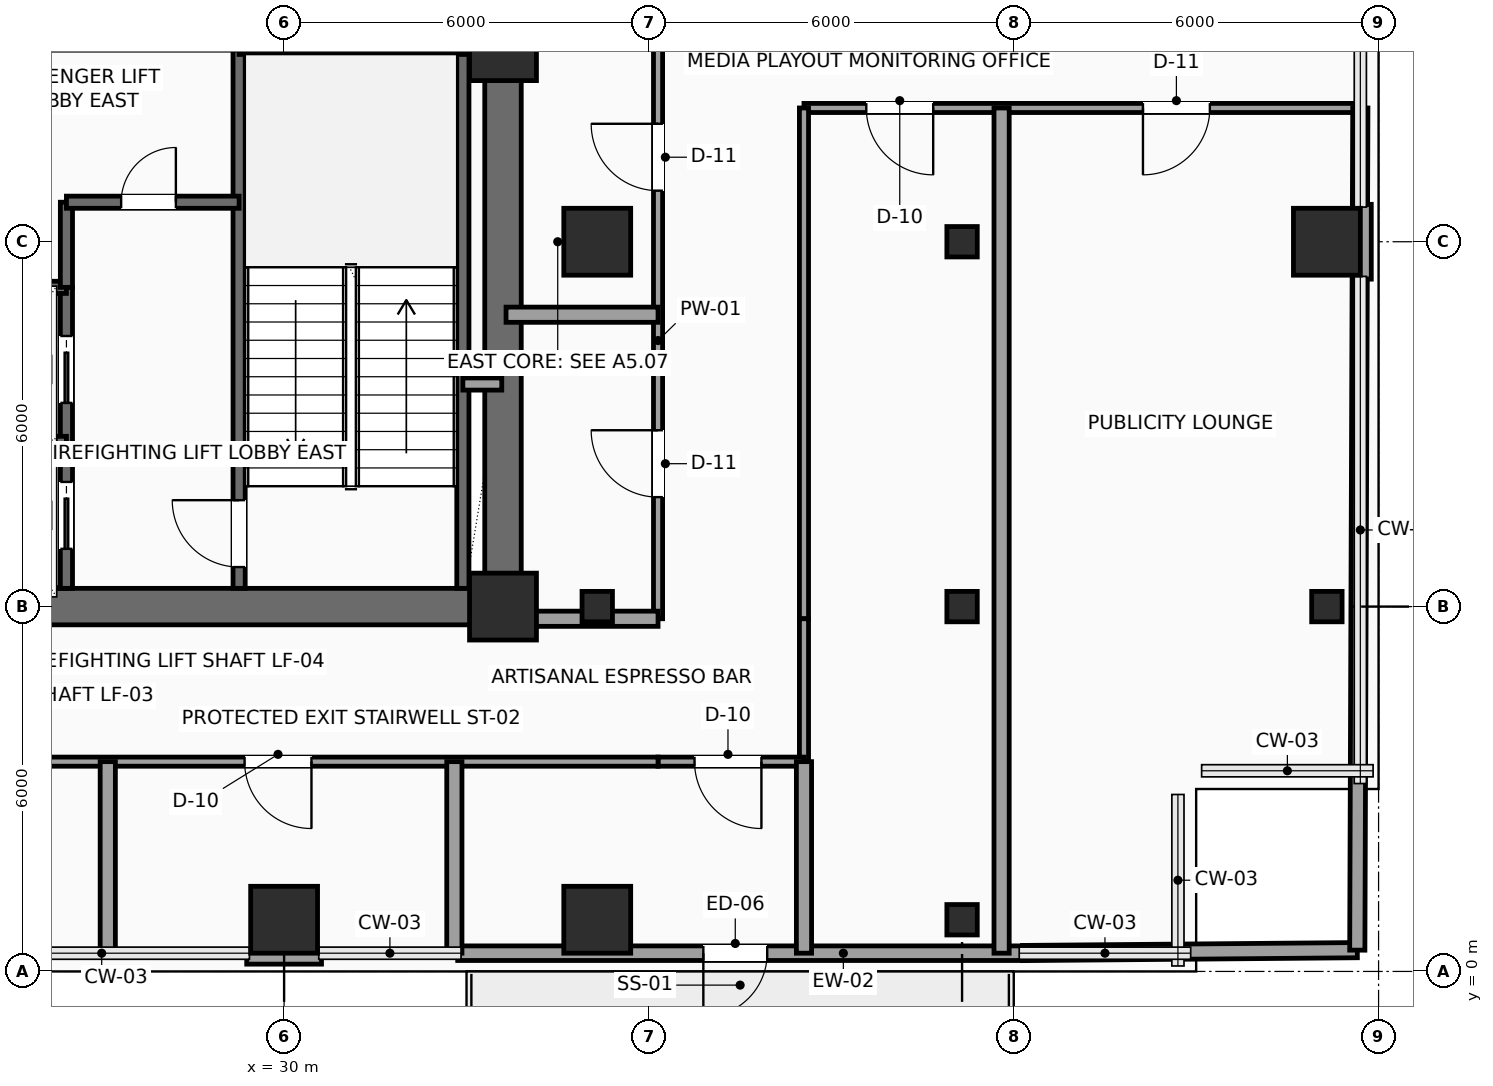
"""IFC4 building model, lengths in metres.
Left out: names, types, materials, properties, quantities, classifications, styles, units other than length and angle.
Written with IfcOpenShell. Run it as: python <this file> out.ifc"""

import sys

from ifc_helpers import new_model, si_unit, direction, frame, frame_2d, origin, origin_2d, place, context, subcontext, project, spatial, rectangle, hollow_rectangle, extrude, element, fill, save


model = new_model("IFC4")
c1 = context("Model", 3, precision=1e-05, world=origin(), true_north=direction((0.0, 1.0)))
c2 = subcontext(c1, "Body", "Model", "MODEL_VIEW")
j1 = project(units=[si_unit("LENGTHUNIT", "METRE"), si_unit("PLANEANGLEUNIT", "RADIAN")], contexts=[c1])
p1 = place(None, origin())
s1 = spatial("IfcSite", under=j1, at=p1, CompositionType="ELEMENT")
p2 = place(p1, origin())
s2 = spatial("IfcBuilding", under=s1, at=p2, CompositionType="ELEMENT")
p3 = place(p2, frame((0.0, 0.0, 134.4)))
s3 = spatial("IfcBuildingStorey", under=s2, at=p3, CompositionType="ELEMENT", Elevation=134.4)
for number, where, z_axis, x_axis in (
    (1, (33.6, 6.0, 0.0), (0.0, 0.0, 1.0), (1.0, 0.0, 0.0)),
    (2, (33.6, 15.2, 0.0), (0.0, 0.0, 1.0), (1.0, 0.0, 0.0)),
    (3, (30.0, 0.85, 0.0), (0.0, 0.0, 1.0), (1.0, 0.0, 0.0)),
    (4, (35.15, 0.85, 0.0), (0.0, 0.0, 1.0), (1.0, 0.0, 0.0)),
):
    element("IfcColumn", number, at=place(p3, frame(where, z_axis=z_axis, x_axis=x_axis)), inside=s3, PredefinedType="COLUMN", context=c2, shape_type="SweptSolid", body=[
        extrude(rectangle(XDim=1.1, YDim=1.1, at=origin_2d()), origin(), (0.0, 0.0, 1.0), 3.75),
    ])
p4 = place(p3, frame((35.15, 6.0, 0.0), z_axis=(0.0, 0.0, 1.0), x_axis=(1.0, 0.0, 0.0)))
e5 = element("IfcColumn", 5, at=p4, inside=s3, PredefinedType="COLUMN", context=c2, shape_type="SweptSolid", body=[
    extrude(hollow_rectangle(XDim=0.5, YDim=0.5, WallThickness=0.025, InnerFilletRadius=0.025, OuterFilletRadius=0.04, at=origin_2d()), origin(), (0.0, 0.0, 1.0), 3.75),
])
p5 = place(p3, frame((35.15, 12.0, 0.0), z_axis=(0.0, 0.0, 1.0), x_axis=(1.0, 0.0, 0.0)))
e6 = element("IfcColumn", 6, at=p5, inside=s3, PredefinedType="COLUMN", context=c2, shape_type="SweptSolid", body=[
    extrude(rectangle(XDim=1.1, YDim=1.1, at=origin_2d()), origin(), (0.0, 0.0, 1.0), 3.75),
])
for number, where, z_axis, x_axis in (
    (7, (41.15, 0.85, 0.0), (0.0, 0.0, 1.0), (1.0, 0.0, 0.0)),
    (8, (41.15, 6.0, 0.0), (0.0, 0.0, 1.0), (1.0, 0.0, 0.0)),
    (9, (41.15, 12.0, 0.0), (0.0, 0.0, 1.0), (1.0, 0.0, 0.0)),
    (10, (47.15, 6.0, 0.0), (0.0, 0.0, 1.0), (1.0, 0.0, 0.0)),
):
    element("IfcColumn", number, at=place(p3, frame(where, z_axis=z_axis, x_axis=x_axis)), inside=s3, PredefinedType="COLUMN", context=c2, shape_type="SweptSolid", body=[
        extrude(hollow_rectangle(XDim=0.5, YDim=0.5, WallThickness=0.025, InnerFilletRadius=0.025, OuterFilletRadius=0.04, at=origin_2d()), origin(), (0.0, 0.0, 1.0), 3.75),
    ])
p6 = place(p3, frame((47.15, 12.0, 0.0), z_axis=(0.0, 0.0, 1.0), x_axis=(1.0, 0.0, 0.0)))
e11 = element("IfcColumn", 11, at=p6, inside=s3, PredefinedType="COLUMN", context=c2, shape_type="SweptSolid", body=[
    extrude(rectangle(XDim=1.1, YDim=1.1, at=origin_2d()), origin(), (0.0, 0.0, 1.0), 3.75),
])
p7 = place(p3, frame((42.145, 0.3, 0.0), z_axis=(0.0, 0.0, 1.0), x_axis=(-1.0, 0.0, 0.0)))
e12 = element("IfcWall", 12, at=p7, inside=s3, PredefinedType="SOLIDWALL", context=c2, shape_type="SweptSolid", body=[
    extrude(rectangle(XDim=9.29, YDim=0.24, at=frame_2d((4.645, 0.0))), origin(), (0.0, 0.0, 1.0), 3.525),
])
p8 = place(p7, frame((4.2, 0.0, 0.0)))
e13 = element("IfcOpeningElement", 13, at=p8, cuts=e12, PredefinedType="OPENING", context=c2, shape_type="SweptSolid", body=[
    extrude(rectangle(XDim=1.05, YDim=2.2, at=frame_2d((0.525, 1.1))), frame((0.0, 0.13, 0.0), z_axis=(0.0, -1.0, 0.0), x_axis=(1.0, 0.0, 0.0)), (0.0, 0.0, 1.0), 0.26),
])
for number, where, z_axis, x_axis in (
    (14, (47.76, 12.615, 0.0), (0.0, 0.0, 1.0), (0.0, -1.0, 0.0)),
    (15, (30.615, 0.24, 0.0), (0.0, 0.0, 1.0), (-1.0, 0.0, 0.0)),
):
    element("IfcWall", number, at=place(p3, frame(where, z_axis=z_axis, x_axis=x_axis)), inside=s3, PredefinedType="SOLIDWALL", context=c2, shape_type="SweptSolid", body=[
        extrude(rectangle(XDim=1.23, YDim=0.24, at=frame_2d((0.615, 0.0))), origin(), (0.0, 0.0, 1.0), 3.525),
    ])
p9 = place(p3, frame((24.0, 6.0, 0.0), z_axis=(0.0, 0.0, 1.0), x_axis=(1.0, 0.0, 0.0)))
e16 = element("IfcWall", 16, at=p9, inside=s3, PredefinedType="SHEAR", context=c2, shape_type="SweptSolid", body=[
    extrude(rectangle(XDim=9.6, YDim=0.6, at=frame_2d((4.8, 0.0))), origin(), (0.0, 0.0, 1.0), 3.525),
])
p10 = place(p3, frame((33.6, 6.0, 0.0), z_axis=(0.0, 0.0, 1.0), x_axis=(0.0, 1.0, 0.0)))
e17 = element("IfcWall", 17, at=p10, inside=s3, PredefinedType="SHEAR", context=c2, shape_type="SweptSolid", body=[
    extrude(rectangle(XDim=12.0, YDim=0.6, at=frame_2d((6.0, 0.0))), origin(), (0.0, 0.0, 1.0), 3.525),
])
p11 = place(p10, frame((10.2, 0.0, 0.0)))
e18 = element("IfcOpeningElement", 18, at=p11, cuts=e17, PredefinedType="OPENING", context=c2, shape_type="SweptSolid", body=[
    extrude(rectangle(XDim=0.9, YDim=2.15, at=frame_2d((0.45, 1.075))), frame((0.0, 0.31, 0.0), z_axis=(0.0, -1.0, 0.0), x_axis=(1.0, 0.0, 0.0)), (0.0, 0.0, 1.0), 0.62),
])
p12 = place(p3, frame((29.26, 6.3, 0.0), z_axis=(0.0, 0.0, 1.0), x_axis=(0.0, 1.0, 0.0)))
e19 = element("IfcWall", 19, at=p12, inside=s3, PredefinedType="SHEAR", context=c2, shape_type="SweptSolid", body=[
    extrude(rectangle(XDim=8.88, YDim=0.2, at=frame_2d((4.44, 0.0))), origin(), (0.0, 0.0, 1.0), 3.525),
])
p13 = place(p12, frame((0.35, 0.0, 0.0)))
e20 = element("IfcOpeningElement", 20, at=p13, cuts=e19, PredefinedType="OPENING", context=c2, shape_type="SweptSolid", body=[
    extrude(rectangle(XDim=1.1, YDim=2.2, at=frame_2d((0.55, 1.1))), frame((0.0, 0.11, 0.0), z_axis=(0.0, -1.0, 0.0), x_axis=(1.0, 0.0, 0.0)), (0.0, 0.0, 1.0), 0.22),
])
p14 = place(p3, frame((32.94, 6.3, 0.0), z_axis=(0.0, 0.0, 1.0), x_axis=(0.0, 1.0, 0.0)))
e21 = element("IfcWall", 21, at=p14, inside=s3, PredefinedType="SHEAR", context=c2, shape_type="SweptSolid", body=[
    extrude(rectangle(XDim=8.88, YDim=0.2, at=frame_2d((4.44, 0.0))), origin(), (0.0, 0.0, 1.0), 3.525),
])
p15 = place(p3, frame((29.26, 15.18, 0.0), z_axis=(0.0, 0.0, 1.0), x_axis=(1.0, 0.0, 0.0)))
e22 = element("IfcWall", 22, at=p15, inside=s3, PredefinedType="SHEAR", context=c2, shape_type="SweptSolid", body=[
    extrude(rectangle(XDim=4.04, YDim=0.2, at=frame_2d((2.02, 0.0))), origin(), (0.0, 0.0, 1.0), 3.525),
])
p16 = place(p3, frame((26.42, 6.3, 0.0), z_axis=(0.0, 0.0, 1.0), x_axis=(0.0, 1.0, 0.0)))
e23 = element("IfcWall", 23, at=p16, inside=s3, PredefinedType="SHEAR", context=c2, shape_type="SweptSolid", body=[
    extrude(rectangle(XDim=4.95, YDim=0.2, at=frame_2d((2.475, 0.0))), origin(), (0.0, 0.0, 1.0), 3.525),
])
p17 = place(p16, frame((0.65, 0.0, 0.0)))
e24 = element("IfcOpeningElement", 24, at=p17, cuts=e23, PredefinedType="OPENING", context=c2, shape_type="SweptSolid", body=[
    extrude(rectangle(XDim=1.1, YDim=2.2, at=frame_2d((0.55, 1.1))), frame((0.0, 0.11, 0.0), z_axis=(0.0, -1.0, 0.0), x_axis=(1.0, 0.0, 0.0)), (0.0, 0.0, 1.0), 0.22),
])
p18 = place(p16, frame((3.05, 0.0, 0.0)))
e25 = element("IfcOpeningElement", 25, at=p18, cuts=e23, PredefinedType="OPENING", context=c2, shape_type="SweptSolid", body=[
    extrude(rectangle(XDim=1.1, YDim=2.2, at=frame_2d((0.55, 1.1))), frame((0.0, 0.11, 0.0), z_axis=(0.0, -1.0, 0.0), x_axis=(1.0, 0.0, 0.0)), (0.0, 0.0, 1.0), 0.22),
])
for number, where, z_axis, x_axis in (
    (26, (24.25, 8.7, 0.0), (0.0, 0.0, 1.0), (1.0, 0.0, 0.0)),
    (27, (24.25, 11.25, 0.0), (0.0, 0.0, 1.0), (1.0, 0.0, 0.0)),
):
    element("IfcWall", number, at=place(p3, frame(where, z_axis=z_axis, x_axis=x_axis)), inside=s3, PredefinedType="SHEAR", context=c2, shape_type="SweptSolid", body=[
        extrude(rectangle(XDim=2.17, YDim=0.2, at=frame_2d((1.085, 0.0))), origin(), (0.0, 0.0, 1.0), 3.525),
    ])
p19 = place(p3, frame((26.42, 11.25, 0.0), z_axis=(0.0, 0.0, 1.0), x_axis=(0.0, 1.0, 0.0)))
e28 = element("IfcWall", 28, at=p19, inside=s3, PredefinedType="SHEAR", context=c2, shape_type="SweptSolid", body=[
    extrude(rectangle(XDim=1.4, YDim=0.2, at=frame_2d((0.7, 0.0))), origin(), (0.0, 0.0, 1.0), 3.525),
])
p20 = place(p3, frame((26.42, 12.65, 0.0), z_axis=(0.0, 0.0, 1.0), x_axis=(1.0, 0.0, 0.0)))
e29 = element("IfcWall", 29, at=p20, inside=s3, PredefinedType="SHEAR", context=c2, shape_type="SweptSolid", body=[
    extrude(rectangle(XDim=2.84, YDim=0.2, at=frame_2d((1.42, 0.0))), origin(), (0.0, 0.0, 1.0), 3.525),
])
p21 = place(p20, frame((0.9, 0.0, 0.0)))
e30 = element("IfcOpeningElement", 30, at=p21, cuts=e29, PredefinedType="OPENING", context=c2, shape_type="SweptSolid", body=[
    extrude(rectangle(XDim=0.9, YDim=2.15, at=frame_2d((0.45, 1.075))), frame((0.0, 0.11, 0.0), z_axis=(0.0, -1.0, 0.0), x_axis=(1.0, 0.0, 0.0)), (0.0, 0.0, 1.0), 0.22),
])
p22 = place(p3, frame((32.94, 9.66, 0.0), z_axis=(0.0, 0.0, 1.0), x_axis=(1.0, 0.0, 0.0)))
e31 = element("IfcWall", 31, at=p22, inside=s3, PredefinedType="SOLIDWALL", context=c2, shape_type="SweptSolid", body=[
    extrude(rectangle(XDim=0.64, YDim=0.2, at=frame_2d((0.32, 0.0))), origin(), (0.0, 0.0, 1.0), 3.525),
])
p23 = place(p3, frame((36.15, 5.8, 0.0), z_axis=(0.0, 0.0, 1.0), x_axis=(0.0, 1.0, 0.0)))
e32 = element("IfcWall", 32, at=p23, inside=s3, PredefinedType="PARTITIONING", context=c2, shape_type="SweptSolid", body=[
    extrude(rectangle(XDim=10.08, YDim=0.15, at=frame_2d((5.04, 0.0))), origin(), (0.0, 0.0, 1.0), 3.525),
])
p24 = place(p23, frame((2.0, 0.0, 0.0)))
e33 = element("IfcOpeningElement", 33, at=p24, cuts=e32, PredefinedType="OPENING", context=c2, shape_type="SweptSolid", body=[
    extrude(rectangle(XDim=1.1, YDim=2.25, at=frame_2d((0.55, 1.125))), frame((0.0, 0.085, 0.0), z_axis=(0.0, -1.0, 0.0), x_axis=(1.0, 0.0, 0.0)), (0.0, 0.0, 1.0), 0.17),
])
p25 = place(p23, frame((7.04, 0.0, 0.0)))
e34 = element("IfcOpeningElement", 34, at=p25, cuts=e32, PredefinedType="OPENING", context=c2, shape_type="SweptSolid", body=[
    extrude(rectangle(XDim=1.1, YDim=2.25, at=frame_2d((0.55, 1.125))), frame((0.0, 0.085, 0.0), z_axis=(0.0, -1.0, 0.0), x_axis=(1.0, 0.0, 0.0)), (0.0, 0.0, 1.0), 0.17),
])
p26 = place(p3, frame((47.7, 14.2, 0.0), z_axis=(0.0, 0.0, 1.0), x_axis=(-1.0, 0.0, 0.0)))
e35 = element("IfcWall", 35, at=p26, inside=s3, PredefinedType="PARTITIONING", context=c2, shape_type="SweptSolid", body=[
    extrude(rectangle(XDim=9.15, YDim=0.15, at=frame_2d((4.575, 0.0))), origin(), (0.0, 0.0, 1.0), 3.525),
])
p27 = place(p26, frame((7.025, 0.0, 0.0)))
e36 = element("IfcOpeningElement", 36, at=p27, cuts=e35, PredefinedType="OPENING", context=c2, shape_type="SweptSolid", body=[
    extrude(rectangle(XDim=1.1, YDim=2.25, at=frame_2d((0.55, 1.125))), frame((0.0, 0.085, 0.0), z_axis=(0.0, -1.0, 0.0), x_axis=(1.0, 0.0, 0.0)), (0.0, 0.0, 1.0), 0.17),
])
p28 = place(p26, frame((2.475, 0.0, 0.0)))
e37 = element("IfcOpeningElement", 37, at=p28, cuts=e35, PredefinedType="OPENING", context=c2, shape_type="SweptSolid", body=[
    extrude(rectangle(XDim=1.1, YDim=2.25, at=frame_2d((0.55, 1.125))), frame((0.0, 0.085, 0.0), z_axis=(0.0, -1.0, 0.0), x_axis=(1.0, 0.0, 0.0)), (0.0, 0.0, 1.0), 0.17),
])
p29 = place(p3, frame((38.55, 14.2, 0.0), z_axis=(0.0, 0.0, 1.0), x_axis=(0.0, -1.0, 0.0)))
e38 = element("IfcWall", 38, at=p29, inside=s3, PredefinedType="PARTITIONING", context=c2, shape_type="SweptSolid", body=[
    extrude(rectangle(XDim=8.4, YDim=0.15, at=frame_2d((4.2, 0.0))), origin(), (0.0, 0.0, 1.0), 3.525),
])
p30 = place(p3, frame((38.55, 5.8, 0.0), z_axis=(0.0, 0.0, 1.0), x_axis=(0.0, -1.0, 0.0)))
e39 = element("IfcWall", 39, at=p30, inside=s3, PredefinedType="PARTITIONING", context=c2, shape_type="SweptSolid", body=[
    extrude(rectangle(XDim=2.35, YDim=0.15, at=frame_2d((1.175, 0.0))), origin(), (0.0, 0.0, 1.0), 3.525),
])
p31 = place(p3, frame((38.55, 3.45, 0.0), z_axis=(0.0, 0.0, 1.0), x_axis=(-1.0, 0.0, 0.0)))
e40 = element("IfcWall", 40, at=p31, inside=s3, PredefinedType="PARTITIONING", context=c2, shape_type="SweptSolid", body=[
    extrude(rectangle(XDim=2.4, YDim=0.15, at=frame_2d((1.2, 0.0))), origin(), (0.0, 0.0, 1.0), 3.067),
])
p32 = place(p31, frame((0.7, 0.0, 0.0)))
e41 = element("IfcOpeningElement", 41, at=p32, cuts=e40, PredefinedType="OPENING", context=c2, shape_type="SweptSolid", body=[
    extrude(rectangle(XDim=1.1, YDim=2.25, at=frame_2d((0.55, 1.125))), frame((0.0, 0.085, 0.0), z_axis=(0.0, -1.0, 0.0), x_axis=(1.0, 0.0, 0.0)), (0.0, 0.0, 1.0), 0.17),
])
p33 = place(p3, frame((36.15, 3.45, 0.0), z_axis=(0.0, 0.0, 1.0), x_axis=(-1.0, 0.0, 0.0)))
e42 = element("IfcWall", 42, at=p33, inside=s3, PredefinedType="PARTITIONING", context=c2, shape_type="SweptSolid", body=[
    extrude(rectangle(XDim=12.2, YDim=0.15, at=frame_2d((6.1, 0.0))), origin(), (0.0, 0.0, 1.0), 3.067),
])
p34 = place(p33, frame((10.125, 0.0, 0.0)))
e43 = element("IfcOpeningElement", 43, at=p34, cuts=e42, PredefinedType="OPENING", context=c2, shape_type="SweptSolid", body=[
    extrude(rectangle(XDim=1.1, YDim=2.25, at=frame_2d((0.55, 1.125))), frame((0.0, 0.085, 0.0), z_axis=(0.0, -1.0, 0.0), x_axis=(1.0, 0.0, 0.0)), (0.0, 0.0, 1.0), 0.17),
])
p35 = place(p33, frame((5.7, 0.0, 0.0)))
e44 = element("IfcOpeningElement", 44, at=p35, cuts=e42, PredefinedType="OPENING", context=c2, shape_type="SweptSolid", body=[
    extrude(rectangle(XDim=1.1, YDim=2.25, at=frame_2d((0.55, 1.125))), frame((0.0, 0.085, 0.0), z_axis=(0.0, -1.0, 0.0), x_axis=(1.0, 0.0, 0.0)), (0.0, 0.0, 1.0), 0.17),
])
for number, where, z_axis, x_axis in (
    (45, (27.1, 0.3, 0.0), (0.0, 0.0, 1.0), (0.0, 1.0, 0.0)),
    (46, (32.8, 0.3, 0.0), (0.0, 0.0, 1.0), (0.0, 1.0, 0.0)),
    (47, (38.55, 0.3, 0.0), (0.0, 0.0, 1.0), (0.0, 1.0, 0.0)),
):
    element("IfcWall", number, at=place(p3, frame(where, z_axis=z_axis, x_axis=x_axis)), inside=s3, PredefinedType="PARTITIONING", context=c2, shape_type="SweptSolid", body=[
        extrude(rectangle(XDim=3.15, YDim=0.25, at=frame_2d((1.575, 0.0))), origin(), (0.0, 0.0, 1.0), 3.525),
    ])
p36 = place(p3, frame((33.65, 5.8, 0.0), z_axis=(0.0, 0.0, 1.0), x_axis=(1.0, 0.0, 0.0)))
e48 = element("IfcWall", 48, at=p36, inside=s3, PredefinedType="PARTITIONING", context=c2, shape_type="SweptSolid", body=[
    extrude(rectangle(XDim=2.5, YDim=0.25, at=frame_2d((1.25, 0.0))), origin(), (0.0, 0.0, 1.0), 3.017),
])
p37 = place(p3, frame((33.65, 10.8, 0.0), z_axis=(0.0, 0.0, 1.0), x_axis=(1.0, 0.0, 0.0)))
e49 = element("IfcWall", 49, at=p37, inside=s3, PredefinedType="PARTITIONING", context=c2, shape_type="SweptSolid", body=[
    extrude(rectangle(XDim=2.5, YDim=0.25, at=frame_2d((1.25, 0.0))), origin(), (0.0, 0.0, 1.0), 3.525),
])
p38 = place(p3, frame((41.8, 0.3, 0.0), z_axis=(0.0, 0.0, 1.0), x_axis=(0.0, 1.0, 0.0)))
e50 = element("IfcWall", 50, at=p38, inside=s3, PredefinedType="PARTITIONING", context=c2, shape_type="SweptSolid", body=[
    extrude(rectangle(XDim=13.9, YDim=0.25, at=frame_2d((6.95, 0.0))), origin(), (0.0, 0.0, 1.0), 3.525),
])
p39 = place(p3, frame((42.145, 0.303, 0.0), z_axis=(0.0, 0.0, 1.0), x_axis=(0.999963369343, 0.008559203933, 0.0)))
e51 = element("IfcWall", 51, at=p39, inside=s3, PredefinedType="PARTITIONING", context=c2, shape_type="SweptSolid", body=[
    extrude(rectangle(XDim=5.505, YDim=0.25, at=frame_2d((2.752, 0.0))), origin(), (0.0, 0.0, 1.0), 3.525),
])
p40 = place(p3, frame((47.65, 0.35, 0.0), z_axis=(0.0, 0.0, 1.0), x_axis=(0.003606251025, 0.999993497456, 0.0)))
e52 = element("IfcWall", 52, at=p40, inside=s3, PredefinedType="PARTITIONING", context=c2, shape_type="SweptSolid", body=[
    extrude(rectangle(XDim=11.035, YDim=0.25, at=frame_2d((5.518, 0.0))), origin(), (0.0, 0.0, 1.0), 3.525),
])
p41 = place(p3, frame((47.694, 12.615, 0.0), z_axis=(0.0, 0.0, 1.0), x_axis=(0.003542799701, 0.999993724265, 0.0)))
e53 = element("IfcWall", 53, at=p41, inside=s3, PredefinedType="PARTITIONING", context=c2, shape_type="SweptSolid", body=[
    extrude(rectangle(XDim=1.585, YDim=0.25, at=frame_2d((0.792, 0.0))), origin(), (0.0, 0.0, 1.0), 3.525),
])
p42 = place(p8, origin())
e54 = element("IfcDoor", 54, at=p42, inside=s3, OperationType="SINGLE_SWING_RIGHT", PredefinedType="DOOR", context=c2, shape_type="SweptSolid", body=[
    extrude(rectangle(XDim=1.05, YDim=2.2, at=frame_2d((0.525, 1.1))), frame((0.0, 0.025, 0.0), z_axis=(0.0, -1.0, 0.0), x_axis=(1.0, 0.0, 0.0)), (0.0, 0.0, 1.0), 0.05),
])
fill(e13, e54)
p43 = place(p13, origin())
e55 = element("IfcDoor", 55, at=p43, inside=s3, OperationType="SINGLE_SWING_RIGHT", PredefinedType="DOOR", context=c2, shape_type="SweptSolid", body=[
    extrude(rectangle(XDim=1.1, YDim=2.2, at=frame_2d((0.55, 1.1))), frame((0.0, 0.025, 0.0), z_axis=(0.0, -1.0, 0.0), x_axis=(1.0, 0.0, 0.0)), (0.0, 0.0, 1.0), 0.05),
])
fill(e20, e55)
p44 = place(p17, origin())
e56 = element("IfcDoor", 56, at=p44, inside=s3, OperationType="SLIDING_TO_LEFT", PredefinedType="DOOR", context=c2, shape_type="SweptSolid", body=[
    extrude(rectangle(XDim=1.1, YDim=2.2, at=frame_2d((0.55, 1.1))), frame((0.0, 0.025, 0.0), z_axis=(0.0, -1.0, 0.0), x_axis=(1.0, 0.0, 0.0)), (0.0, 0.0, 1.0), 0.05),
])
fill(e24, e56)
p45 = place(p18, origin())
e57 = element("IfcDoor", 57, at=p45, inside=s3, OperationType="SLIDING_TO_LEFT", PredefinedType="DOOR", context=c2, shape_type="SweptSolid", body=[
    extrude(rectangle(XDim=1.1, YDim=2.2, at=frame_2d((0.55, 1.1))), frame((0.0, 0.025, 0.0), z_axis=(0.0, -1.0, 0.0), x_axis=(1.0, 0.0, 0.0)), (0.0, 0.0, 1.0), 0.05),
])
fill(e25, e57)
p46 = place(p21, origin())
e58 = element("IfcDoor", 58, at=p46, inside=s3, OperationType="SINGLE_SWING_RIGHT", PredefinedType="DOOR", context=c2, shape_type="SweptSolid", body=[
    extrude(rectangle(XDim=0.9, YDim=2.15, at=frame_2d((0.45, 1.075))), frame((0.0, 0.025, 0.0), z_axis=(0.0, -1.0, 0.0), x_axis=(1.0, 0.0, 0.0)), (0.0, 0.0, 1.0), 0.05),
])
fill(e30, e58)
p47 = place(p24, origin())
e59 = element("IfcDoor", 59, at=p47, inside=s3, OperationType="SINGLE_SWING_RIGHT", PredefinedType="DOOR", context=c2, shape_type="SweptSolid", body=[
    extrude(rectangle(XDim=1.1, YDim=2.25, at=frame_2d((0.55, 1.125))), frame((0.0, 0.025, 0.0), z_axis=(0.0, -1.0, 0.0), x_axis=(1.0, 0.0, 0.0)), (0.0, 0.0, 1.0), 0.05),
])
fill(e33, e59)
p48 = place(p25, origin())
e60 = element("IfcDoor", 60, at=p48, inside=s3, OperationType="SINGLE_SWING_RIGHT", PredefinedType="DOOR", context=c2, shape_type="SweptSolid", body=[
    extrude(rectangle(XDim=1.1, YDim=2.25, at=frame_2d((0.55, 1.125))), frame((0.0, 0.025, 0.0), z_axis=(0.0, -1.0, 0.0), x_axis=(1.0, 0.0, 0.0)), (0.0, 0.0, 1.0), 0.05),
])
fill(e34, e60)
p49 = place(p27, origin())
e61 = element("IfcDoor", 61, at=p49, inside=s3, OperationType="SINGLE_SWING_LEFT", PredefinedType="DOOR", context=c2, shape_type="SweptSolid", body=[
    extrude(rectangle(XDim=1.1, YDim=2.25, at=frame_2d((0.55, 1.125))), frame((0.0, 0.025, 0.0), z_axis=(0.0, -1.0, 0.0), x_axis=(1.0, 0.0, 0.0)), (0.0, 0.0, 1.0), 0.05),
])
fill(e36, e61)
p50 = place(p28, origin())
e62 = element("IfcDoor", 62, at=p50, inside=s3, OperationType="SINGLE_SWING_RIGHT", PredefinedType="DOOR", context=c2, shape_type="SweptSolid", body=[
    extrude(rectangle(XDim=1.1, YDim=2.25, at=frame_2d((0.55, 1.125))), frame((0.0, 0.025, 0.0), z_axis=(0.0, -1.0, 0.0), x_axis=(1.0, 0.0, 0.0)), (0.0, 0.0, 1.0), 0.05),
])
fill(e37, e62)
p51 = place(p32, origin())
e63 = element("IfcDoor", 63, at=p51, inside=s3, OperationType="SINGLE_SWING_LEFT", PredefinedType="DOOR", context=c2, shape_type="SweptSolid", body=[
    extrude(rectangle(XDim=1.1, YDim=2.25, at=frame_2d((0.55, 1.125))), frame((0.0, 0.025, 0.0), z_axis=(0.0, -1.0, 0.0), x_axis=(1.0, 0.0, 0.0)), (0.0, 0.0, 1.0), 0.05),
])
fill(e41, e63)
p52 = place(p35, origin())
e64 = element("IfcDoor", 64, at=p52, inside=s3, OperationType="SINGLE_SWING_LEFT", PredefinedType="DOOR", context=c2, shape_type="SweptSolid", body=[
    extrude(rectangle(XDim=1.1, YDim=2.25, at=frame_2d((0.55, 1.125))), frame((0.0, 0.025, 0.0), z_axis=(0.0, -1.0, 0.0), x_axis=(1.0, 0.0, 0.0)), (0.0, 0.0, 1.0), 0.05),
])
fill(e44, e64)
save(model, sys.argv[1])
